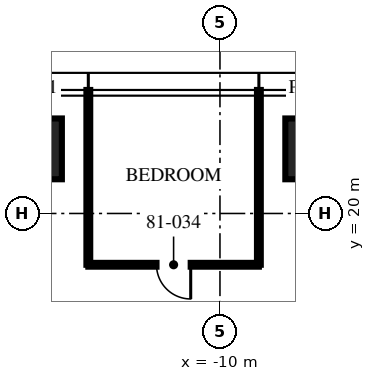
"""IFC4 building model, lengths in metres.
Left out: names, types, materials, properties, quantities, classifications, styles, units other than length and angle.
Written with IfcOpenShell. Run it as: python <this file> out.ifc"""

import sys

from ifc_helpers import new_model, si_unit, direction, frame, frame_2d, origin, origin_2d, place, context, subcontext, project, spatial, rectangle, extrude, element, fill, save


model = new_model("IFC4")
c1 = context("Model", 3, precision=1e-05, world=origin(), true_north=direction((0.0, 1.0)))
c2 = subcontext(c1, "Body", "Model", "MODEL_VIEW")
j1 = project(units=[si_unit("LENGTHUNIT", "METRE"), si_unit("PLANEANGLEUNIT", "RADIAN")], contexts=[c1])
p1 = place(None, origin())
s1 = spatial("IfcSite", under=j1, at=p1, CompositionType="ELEMENT")
p2 = place(p1, origin())
s2 = spatial("IfcBuilding", under=s1, at=p2, CompositionType="ELEMENT")
p3 = place(p2, frame((0.0, 0.0, 323.25)))
s3 = spatial("IfcBuildingStorey", under=s2, at=p3, CompositionType="ELEMENT", Elevation=323.25)
for number, where, z_axis, x_axis in (
    (1, (-14.96, 21.7, 0.0), (0.0, 0.0, 1.0), (1.0, 0.0, 0.0)),
    (2, (-7.48, 21.7, 0.0), (0.0, 0.0, 1.0), (1.0, 0.0, 0.0)),
):
    element("IfcColumn", number, at=place(p3, frame(where, z_axis=z_axis, x_axis=x_axis)), inside=s3, PredefinedType="COLUMN", context=c2, shape_type="SweptSolid", body=[
        extrude(rectangle(XDim=1.6, YDim=1.6, at=origin_2d()), origin(), (0.0, 0.0, 1.0), 3.75),
    ])
for number, where, z_axis, x_axis in (
    (3, (-8.976, 18.65, 0.0), (0.0, 0.0, 1.0), (0.0, 1.0, 0.0)),
    (4, (-13.464, 18.65, 0.0), (0.0, 0.0, 1.0), (0.0, 1.0, 0.0)),
):
    element("IfcWall", number, at=place(p3, frame(where, z_axis=z_axis, x_axis=x_axis)), inside=s3, PredefinedType="PARTITIONING", context=c2, shape_type="SweptSolid", body=[
        extrude(rectangle(XDim=4.6, YDim=0.1, at=frame_2d((2.3, 0.0))), origin(), (0.0, 0.0, 1.0), 3.01),
    ])
p4 = place(p3, frame((-8.976, 18.65, 0.0), z_axis=(0.0, 0.0, 1.0), x_axis=(-1.0, 0.0, 0.0)))
e5 = element("IfcWall", 5, at=p4, inside=s3, PredefinedType="PARTITIONING", context=c2, shape_type="SweptSolid", body=[
    extrude(rectangle(XDim=4.488, YDim=0.1, at=frame_2d((2.244, 0.0))), origin(), (0.0, 0.0, 1.0), 2.91),
])
p5 = place(p4, frame((1.794, 0.0, 0.0)))
e6 = element("IfcOpeningElement", 6, at=p5, cuts=e5, PredefinedType="OPENING", context=c2, shape_type="SweptSolid", body=[
    extrude(rectangle(XDim=0.9, YDim=2.1, at=frame_2d((0.45, 1.05))), frame((0.0, 0.06, 0.0), z_axis=(0.0, -1.0, 0.0), x_axis=(1.0, 0.0, 0.0)), (0.0, 0.0, 1.0), 0.12),
])
p6 = place(p5, origin())
e7 = element("IfcDoor", 7, at=p6, inside=s3, OperationType="SINGLE_SWING_LEFT", PredefinedType="DOOR", context=c2, shape_type="SweptSolid", body=[
    extrude(rectangle(XDim=0.9, YDim=2.1, at=frame_2d((0.45, 1.05))), frame((0.0, 0.025, 0.0), z_axis=(0.0, -1.0, 0.0), x_axis=(1.0, 0.0, 0.0)), (0.0, 0.0, 1.0), 0.05),
])
fill(e6, e7)
save(model, sys.argv[1])
